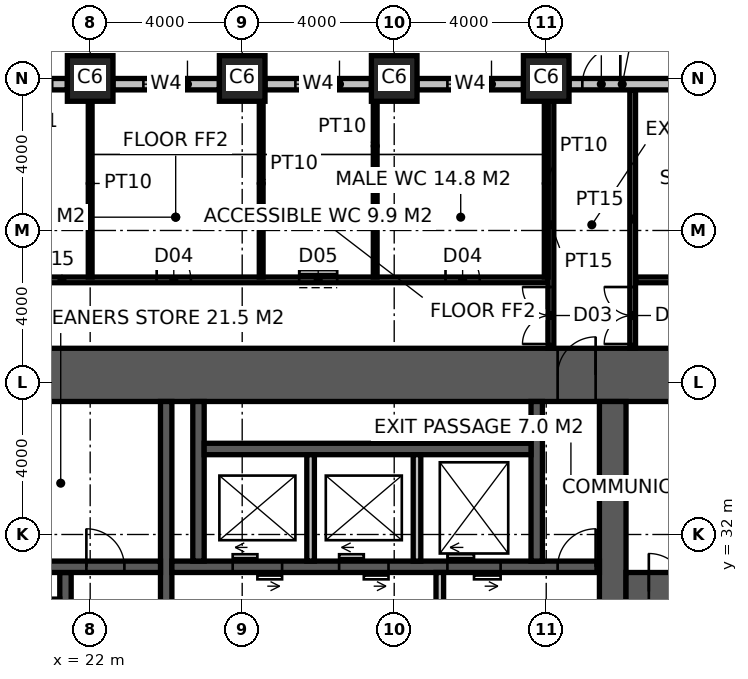
"""IFC4 building model, lengths in metres.
Left out: names, types, materials, properties, quantities, classifications, styles, units other than length and angle.
Written with IfcOpenShell. Run it as: python <this file> out.ifc"""

import sys

from ifc_helpers import new_model, si_unit, direction, frame, frame_2d, origin, origin_2d, place, context, subcontext, project, spatial, rectangle, hollow_rectangle, extrude, element, fill, save


model = new_model("IFC4")
c1 = context("Model", 3, precision=1e-05, world=origin(), true_north=direction((0.0, 1.0)))
c2 = subcontext(c1, "Body", "Model", "MODEL_VIEW")
j1 = project(units=[si_unit("LENGTHUNIT", "METRE"), si_unit("PLANEANGLEUNIT", "RADIAN")], contexts=[c1])
p1 = place(None, origin())
s1 = spatial("IfcSite", under=j1, at=p1, CompositionType="ELEMENT")
p2 = place(p1, origin())
s2 = spatial("IfcBuilding", under=s1, at=p2, CompositionType="ELEMENT")
p3 = place(p2, origin())
s3 = spatial("IfcBuildingStorey", under=s2, at=p3, CompositionType="ELEMENT", Elevation=0.0)
for number, where, z_axis, x_axis in (
    (1, (22.0, 44.0, -0.3), (0.0, 0.0, 1.0), (1.0, 0.0, 0.0)),
    (2, (26.0, 44.0, -0.3), (0.0, 0.0, 1.0), (1.0, 0.0, 0.0)),
    (3, (30.0, 44.0, -0.3), (0.0, 0.0, 1.0), (1.0, 0.0, 0.0)),
    (4, (34.0, 44.0, -0.3), (0.0, 0.0, 1.0), (1.0, 0.0, 0.0)),
):
    element("IfcColumn", number, at=place(p3, frame(where, z_axis=z_axis, x_axis=x_axis)), inside=s3, PredefinedType="COLUMN", context=c2, shape_type="SweptSolid", body=[
        extrude(hollow_rectangle(XDim=1.2, YDim=1.2, WallThickness=0.125, at=origin_2d()), origin(), (0.0, 0.0, 1.0), 6.3),
    ])
p4 = place(p3, frame((18.5, 36.2, -0.3), z_axis=(0.0, 0.0, 1.0), x_axis=(1.0, 0.0, 0.0)))
e5 = element("IfcWall", 5, at=p4, inside=s3, PredefinedType="SHEAR", context=c2, shape_type="SweptSolid", body=[
    extrude(rectangle(XDim=23.0, YDim=1.4, at=frame_2d((11.5, 0.0))), origin(), (0.0, 0.0, 1.0), 6.15),
])
p5 = place(p4, frame((15.8, 0.0, 0.3)))
e6 = element("IfcOpeningElement", 6, at=p5, cuts=e5, PredefinedType="OPENING", context=c2, shape_type="SweptSolid", body=[
    extrude(rectangle(XDim=1.0, YDim=2.2, at=frame_2d((0.5, 1.1))), frame((0.0, 0.71, 0.0), z_axis=(0.0, -1.0, 0.0), x_axis=(1.0, 0.0, 0.0)), (0.0, 0.0, 1.0), 1.42),
])
p6 = place(p3, frame((35.75, 18.5, -0.3), z_axis=(0.0, 0.0, 1.0), x_axis=(0.0, 1.0, 0.0)))
e7 = element("IfcWall", 7, at=p6, inside=s3, PredefinedType="SHEAR", context=c2, shape_type="SweptSolid", body=[
    extrude(rectangle(XDim=17.0, YDim=0.7, at=frame_2d((8.5, 0.0))), origin(), (0.0, 0.0, 1.0), 6.15),
])
p7 = place(p6, frame((9.85, 0.0, 0.3)))
e8 = element("IfcOpeningElement", 8, at=p7, cuts=e7, PredefinedType="OPENING", context=c2, shape_type="SweptSolid", body=[
    extrude(rectangle(XDim=1.0, YDim=2.2, at=frame_2d((0.5, 1.1))), frame((0.0, 0.36, 0.0), z_axis=(0.0, -1.0, 0.0), x_axis=(1.0, 0.0, 0.0)), (0.0, 0.0, 1.0), 0.72),
])
p8 = place(p3, frame((24.0, 18.5, -0.3), z_axis=(0.0, 0.0, 1.0), x_axis=(0.0, 1.0, 0.0)))
e9 = element("IfcWall", 9, at=p8, inside=s3, PredefinedType="SHEAR", context=c2, shape_type="SweptSolid", body=[
    extrude(rectangle(XDim=17.0, YDim=0.3, at=frame_2d((8.5, 0.0))), origin(), (0.0, 0.0, 1.0), 6.15),
])
p9 = place(p8, frame((9.6, 0.0, 0.3)))
e10 = element("IfcOpeningElement", 10, at=p9, cuts=e9, PredefinedType="OPENING", context=c2, shape_type="SweptSolid", body=[
    extrude(rectangle(XDim=1.5, YDim=2.4, at=frame_2d((0.75, 1.2))), frame((0.0, 0.16, 0.0), z_axis=(0.0, -1.0, 0.0), x_axis=(1.0, 0.0, 0.0)), (0.0, 0.0, 1.0), 0.32),
])
p10 = place(p3, frame((24.15, 31.15, -0.3), z_axis=(0.0, 0.0, 1.0), x_axis=(1.0, 0.0, 0.0)))
e11 = element("IfcWall", 11, at=p10, inside=s3, PredefinedType="SHEAR", context=c2, shape_type="SweptSolid", body=[
    extrude(rectangle(XDim=11.25, YDim=0.3, at=frame_2d((5.625, 0.0))), origin(), (0.0, 0.0, 1.0), 6.15),
])
p11 = place(p10, frame((10.15, 0.0, 0.3)))
e12 = element("IfcOpeningElement", 12, at=p11, cuts=e11, PredefinedType="OPENING", context=c2, shape_type="SweptSolid", body=[
    extrude(rectangle(XDim=1.0, YDim=2.2, at=frame_2d((0.5, 1.1))), frame((0.0, 0.16, 0.0), z_axis=(0.0, -1.0, 0.0), x_axis=(1.0, 0.0, 0.0)), (0.0, 0.0, 1.0), 0.32),
])
p12 = place(p10, frame((1.6, 0.0, 0.3)))
e13 = element("IfcOpeningElement", 13, at=p12, cuts=e11, PredefinedType="OPENING", context=c2, shape_type="SweptSolid", body=[
    extrude(rectangle(XDim=1.3, YDim=2.4, at=frame_2d((0.65, 1.2))), frame((0.0, 0.16, 0.0), z_axis=(0.0, -1.0, 0.0), x_axis=(1.0, 0.0, 0.0)), (0.0, 0.0, 1.0), 0.32),
])
p13 = place(p10, frame((4.4, 0.0, 0.3)))
e14 = element("IfcOpeningElement", 14, at=p13, cuts=e11, PredefinedType="OPENING", context=c2, shape_type="SweptSolid", body=[
    extrude(rectangle(XDim=1.3, YDim=2.4, at=frame_2d((0.65, 1.2))), frame((0.0, 0.16, 0.0), z_axis=(0.0, -1.0, 0.0), x_axis=(1.0, 0.0, 0.0)), (0.0, 0.0, 1.0), 0.32),
])
p14 = place(p10, frame((7.25, 0.0, 0.3)))
e15 = element("IfcOpeningElement", 15, at=p14, cuts=e11, PredefinedType="OPENING", context=c2, shape_type="SweptSolid", body=[
    extrude(rectangle(XDim=1.4, YDim=2.4, at=frame_2d((0.7, 1.2))), frame((0.0, 0.16, 0.0), z_axis=(0.0, -1.0, 0.0), x_axis=(1.0, 0.0, 0.0)), (0.0, 0.0, 1.0), 0.32),
])
p15 = place(p3, frame((21.35, 18.5, -0.3), z_axis=(0.0, 0.0, 1.0), x_axis=(0.0, 1.0, 0.0)))
e16 = element("IfcWall", 16, at=p15, inside=s3, PredefinedType="SHEAR", context=c2, shape_type="SweptSolid", body=[
    extrude(rectangle(XDim=12.5, YDim=0.3, at=frame_2d((6.25, 0.0))), origin(), (0.0, 0.0, 1.0), 6.15),
])
p16 = place(p15, frame((8.15, 0.0, 0.3)))
e17 = element("IfcOpeningElement", 17, at=p16, cuts=e16, PredefinedType="OPENING", context=c2, shape_type="SweptSolid", body=[
    extrude(rectangle(XDim=1.0, YDim=2.2, at=frame_2d((0.5, 1.1))), frame((0.0, 0.16, 0.0), z_axis=(0.0, -1.0, 0.0), x_axis=(1.0, 0.0, 0.0)), (0.0, 0.0, 1.0), 0.32),
])
p17 = place(p3, frame((18.5, 31.15, -0.3), z_axis=(0.0, 0.0, 1.0), x_axis=(1.0, 0.0, 0.0)))
e18 = element("IfcWall", 18, at=p17, inside=s3, PredefinedType="SHEAR", context=c2, shape_type="SweptSolid", body=[
    extrude(rectangle(XDim=5.35, YDim=0.3, at=frame_2d((2.675, 0.0))), origin(), (0.0, 0.0, 1.0), 6.15),
])
p18 = place(p17, frame((3.4, 0.0, 0.3)))
e19 = element("IfcOpeningElement", 19, at=p18, cuts=e18, PredefinedType="OPENING", context=c2, shape_type="SweptSolid", body=[
    extrude(rectangle(XDim=1.0, YDim=2.2, at=frame_2d((0.5, 1.1))), frame((0.0, 0.16, 0.0), z_axis=(0.0, -1.0, 0.0), x_axis=(1.0, 0.0, 0.0)), (0.0, 0.0, 1.0), 0.32),
])
for number, where, z_axis, x_axis in (
    (20, (24.85, 31.3, -0.3), (0.0, 0.0, 1.0), (0.0, 1.0, 0.0)),
    (21, (33.75, 31.3, -0.3), (0.0, 0.0, 1.0), (0.0, 1.0, 0.0)),
):
    element("IfcWall", number, at=place(p3, frame(where, z_axis=z_axis, x_axis=x_axis)), inside=s3, PredefinedType="SHEAR", context=c2, shape_type="SweptSolid", body=[
        extrude(rectangle(XDim=4.2, YDim=0.3, at=frame_2d((2.1, 0.0))), origin(), (0.0, 0.0, 1.0), 6.15),
    ])
p19 = place(p3, frame((25.0, 34.25, -0.3), z_axis=(0.0, 0.0, 1.0), x_axis=(1.0, 0.0, 0.0)))
e22 = element("IfcWall", 22, at=p19, inside=s3, PredefinedType="SHEAR", context=c2, shape_type="SweptSolid", body=[
    extrude(rectangle(XDim=8.6, YDim=0.3, at=frame_2d((4.3, 0.0))), origin(), (0.0, 0.0, 1.0), 6.15),
])
for number, where, z_axis, x_axis in (
    (23, (27.8, 31.3, -0.3), (0.0, 0.0, 1.0), (0.0, 1.0, 0.0)),
    (24, (30.6, 31.3, -0.3), (0.0, 0.0, 1.0), (0.0, 1.0, 0.0)),
):
    element("IfcWall", number, at=place(p3, frame(where, z_axis=z_axis, x_axis=x_axis)), inside=s3, PredefinedType="SOLIDWALL", context=c2, shape_type="SweptSolid", body=[
        extrude(rectangle(XDim=2.8, YDim=0.2, at=frame_2d((1.4, 0.0))), origin(), (0.0, 0.0, 1.0), 6.15),
    ])
p20 = place(p3, frame((36.1, 30.5, -0.3), z_axis=(0.0, 0.0, 1.0), x_axis=(1.0, 0.0, 0.0)))
e25 = element("IfcWall", 25, at=p20, inside=s3, PredefinedType="SHEAR", context=c2, shape_type="SweptSolid", body=[
    extrude(rectangle(XDim=5.4, YDim=1.0, at=frame_2d((2.7, 0.0))), origin(), (0.0, 0.0, 1.0), 6.15),
])
p21 = place(p20, frame((0.6, 0.0, 0.3)))
e26 = element("IfcOpeningElement", 26, at=p21, cuts=e25, PredefinedType="OPENING", context=c2, shape_type="SweptSolid", body=[
    extrude(rectangle(XDim=1.0, YDim=2.2, at=frame_2d((0.5, 1.1))), frame((0.0, 0.51, 0.0), z_axis=(0.0, -1.0, 0.0), x_axis=(1.0, 0.0, 0.0)), (0.0, 0.0, 1.0), 1.02),
])
p22 = place(p3, frame((31.2, 26.7, 0.0), z_axis=(0.0, 0.0, 1.0), x_axis=(0.0, 1.0, 0.0)))
e27 = element("IfcWall", 27, at=p22, inside=s3, PredefinedType="SOLIDWALL", context=c2, shape_type="SweptSolid", body=[
    extrude(rectangle(XDim=4.3, YDim=0.2, at=frame_2d((2.15, 0.0))), origin(), (0.0, 0.0, 1.0), 5.85),
])
p23 = place(p3, frame((15.775, 38.7, 0.0), z_axis=(0.0, 0.0, 1.0), x_axis=(1.0, 0.0, 0.0)))
e28 = element("IfcWall", 28, at=p23, inside=s3, PredefinedType="PARTITIONING", context=c2, shape_type="SweptSolid", body=[
    extrude(rectangle(XDim=18.275, YDim=0.15, at=frame_2d((9.138, 0.0))), origin(), (0.0, 0.0, 1.0), 5.85),
])
p24 = place(p23, frame((2.825, 0.0, 0.0)))
e29 = element("IfcOpeningElement", 29, at=p24, cuts=e28, PredefinedType="OPENING", context=c2, shape_type="SweptSolid", body=[
    extrude(rectangle(XDim=1.0, YDim=2.2, at=frame_2d((0.5, 1.1))), frame((0.0, 0.085, 0.0), z_axis=(0.0, -1.0, 0.0), x_axis=(1.0, 0.0, 0.0)), (0.0, 0.0, 1.0), 0.17),
])
p25 = place(p23, frame((7.975, 0.0, 0.0)))
e30 = element("IfcOpeningElement", 30, at=p25, cuts=e28, PredefinedType="OPENING", context=c2, shape_type="SweptSolid", body=[
    extrude(rectangle(XDim=0.9, YDim=2.1, at=frame_2d((0.45, 1.05))), frame((0.0, 0.085, 0.0), z_axis=(0.0, -1.0, 0.0), x_axis=(1.0, 0.0, 0.0)), (0.0, 0.0, 1.0), 0.17),
])
p26 = place(p23, frame((11.725, 0.0, 0.0)))
e31 = element("IfcOpeningElement", 31, at=p26, cuts=e28, PredefinedType="OPENING", context=c2, shape_type="SweptSolid", body=[
    extrude(rectangle(XDim=1.0, YDim=2.1, at=frame_2d((0.5, 1.05))), frame((0.0, 0.085, 0.0), z_axis=(0.0, -1.0, 0.0), x_axis=(1.0, 0.0, 0.0)), (0.0, 0.0, 1.0), 0.17),
])
p27 = place(p23, frame((15.575, 0.0, 0.0)))
e32 = element("IfcOpeningElement", 32, at=p27, cuts=e28, PredefinedType="OPENING", context=c2, shape_type="SweptSolid", body=[
    extrude(rectangle(XDim=0.9, YDim=2.1, at=frame_2d((0.45, 1.05))), frame((0.0, 0.085, 0.0), z_axis=(0.0, -1.0, 0.0), x_axis=(1.0, 0.0, 0.0)), (0.0, 0.0, 1.0), 0.17),
])
p28 = place(p3, frame((36.35, 38.7, 0.0), z_axis=(0.0, 0.0, 1.0), x_axis=(1.0, 0.0, 0.0)))
e33 = element("IfcWall", 33, at=p28, inside=s3, PredefinedType="PARTITIONING", context=c2, shape_type="SweptSolid", body=[
    extrude(rectangle(XDim=7.875, YDim=0.15, at=frame_2d((3.938, 0.0))), origin(), (0.0, 0.0, 1.0), 5.85),
])
p29 = place(p28, frame((2.15, 0.0, 0.0)))
e34 = element("IfcOpeningElement", 34, at=p29, cuts=e33, PredefinedType="OPENING", context=c2, shape_type="SweptSolid", body=[
    extrude(rectangle(XDim=1.0, YDim=2.2, at=frame_2d((0.5, 1.1))), frame((0.0, 0.085, 0.0), z_axis=(0.0, -1.0, 0.0), x_axis=(1.0, 0.0, 0.0)), (0.0, 0.0, 1.0), 0.17),
])
p30 = place(p3, frame((34.125, 36.9, 0.0), z_axis=(0.0, 0.0, 1.0), x_axis=(0.0, 1.0, 0.0)))
e35 = element("IfcWall", 35, at=p30, inside=s3, PredefinedType="PARTITIONING", context=c2, shape_type="SweptSolid", body=[
    extrude(rectangle(XDim=6.5, YDim=0.15, at=frame_2d((3.25, 0.0))), origin(), (0.0, 0.0, 1.0), 4.95),
])
p31 = place(p30, frame((0.113, 0.0, 0.0)))
e36 = element("IfcOpeningElement", 36, at=p31, cuts=e35, PredefinedType="OPENING", context=c2, shape_type="SweptSolid", body=[
    extrude(rectangle(XDim=1.5, YDim=2.4, at=frame_2d((0.75, 1.2))), frame((0.0, 0.085, 0.0), z_axis=(0.0, -1.0, 0.0), x_axis=(1.0, 0.0, 0.0)), (0.0, 0.0, 1.0), 0.17),
])
p32 = place(p3, frame((36.275, 36.9, 0.0), z_axis=(0.0, 0.0, 1.0), x_axis=(0.0, 1.0, 0.0)))
e37 = element("IfcWall", 37, at=p32, inside=s3, PredefinedType="PARTITIONING", context=c2, shape_type="SweptSolid", body=[
    extrude(rectangle(XDim=6.8, YDim=0.15, at=frame_2d((3.4, 0.0))), origin(), (0.0, 0.0, 1.0), 5.85),
])
p33 = place(p32, frame((0.113, 0.0, 0.0)))
e38 = element("IfcOpeningElement", 38, at=p33, cuts=e37, PredefinedType="OPENING", context=c2, shape_type="SweptSolid", body=[
    extrude(rectangle(XDim=1.5, YDim=2.4, at=frame_2d((0.75, 1.2))), frame((0.0, 0.085, 0.0), z_axis=(0.0, -1.0, 0.0), x_axis=(1.0, 0.0, 0.0)), (0.0, 0.0, 1.0), 0.17),
])
p34 = place(p3, frame((22.0, 38.775, 0.0), z_axis=(0.0, 0.0, 1.0), x_axis=(0.0, 1.0, 0.0)))
e39 = element("IfcWall", 39, at=p34, inside=s3, PredefinedType="PARTITIONING", context=c2, shape_type="SweptSolid", body=[
    extrude(rectangle(XDim=4.925, YDim=0.1, at=frame_2d((2.462, 0.0))), origin(), (0.0, 0.0, 1.0), 4.95),
])
for number, where, z_axis, x_axis in (
    (40, (26.5, 38.775, 0.0), (0.0, 0.0, 1.0), (0.0, 1.0, 0.0)),
    (41, (29.5, 38.775, 0.0), (0.0, 0.0, 1.0), (0.0, 1.0, 0.0)),
):
    element("IfcWall", number, at=place(p3, frame(where, z_axis=z_axis, x_axis=x_axis)), inside=s3, PredefinedType="PARTITIONING", context=c2, shape_type="SweptSolid", body=[
        extrude(rectangle(XDim=4.925, YDim=0.1, at=frame_2d((2.462, 0.0))), origin(), (0.0, 0.0, 1.0), 5.85),
    ])
p35 = place(p3, frame((34.0, 38.775, 0.0), z_axis=(0.0, 0.0, 1.0), x_axis=(0.0, 1.0, 0.0)))
e42 = element("IfcWall", 42, at=p35, inside=s3, PredefinedType="PARTITIONING", context=c2, shape_type="SweptSolid", body=[
    extrude(rectangle(XDim=4.925, YDim=0.1, at=frame_2d((2.462, 0.0))), origin(), (0.0, 0.0, 1.0), 4.95),
])
p36 = place(p3, frame((21.4, 43.85, 0.0), z_axis=(0.0, 0.0, 1.0), x_axis=(-1.0, 0.0, 0.0)))
e43 = element("IfcWall", 43, at=p36, inside=s3, PredefinedType="ELEMENTEDWALL", context=c2, shape_type="SweptSolid", body=[
    extrude(rectangle(XDim=2.8, YDim=0.3, at=frame_2d((1.4, 0.0))), origin(), (0.0, 0.0, 1.0), 4.95),
])
p37 = place(p36, frame((0.4, 0.0, 1.2)))
e44 = element("IfcOpeningElement", 44, at=p37, cuts=e43, PredefinedType="OPENING", context=c2, shape_type="SweptSolid", body=[
    extrude(rectangle(XDim=2.0, YDim=3.6, at=frame_2d((1.0, 1.8))), frame((0.0, 0.16, 0.0), z_axis=(0.0, -1.0, 0.0), x_axis=(1.0, 0.0, 0.0)), (0.0, 0.0, 1.0), 0.32),
])
p38 = place(p3, frame((25.4, 43.85, 0.0), z_axis=(0.0, 0.0, 1.0), x_axis=(-1.0, 0.0, 0.0)))
e45 = element("IfcWall", 45, at=p38, inside=s3, PredefinedType="ELEMENTEDWALL", context=c2, shape_type="SweptSolid", body=[
    extrude(rectangle(XDim=2.8, YDim=0.3, at=frame_2d((1.4, 0.0))), origin(), (0.0, 0.0, 1.0), 4.95),
])
p39 = place(p38, frame((0.8, 0.0, 1.8)))
e46 = element("IfcOpeningElement", 46, at=p39, cuts=e45, PredefinedType="OPENING", context=c2, shape_type="SweptSolid", body=[
    extrude(rectangle(XDim=1.2, YDim=1.2, at=frame_2d((0.6, 0.6))), frame((0.0, 0.16, 0.0), z_axis=(0.0, -1.0, 0.0), x_axis=(1.0, 0.0, 0.0)), (0.0, 0.0, 1.0), 0.32),
])
p40 = place(p3, frame((29.4, 43.85, 0.0), z_axis=(0.0, 0.0, 1.0), x_axis=(-1.0, 0.0, 0.0)))
e47 = element("IfcWall", 47, at=p40, inside=s3, PredefinedType="ELEMENTEDWALL", context=c2, shape_type="SweptSolid", body=[
    extrude(rectangle(XDim=2.8, YDim=0.3, at=frame_2d((1.4, 0.0))), origin(), (0.0, 0.0, 1.0), 4.95),
])
p41 = place(p40, frame((0.8, 0.0, 1.8)))
e48 = element("IfcOpeningElement", 48, at=p41, cuts=e47, PredefinedType="OPENING", context=c2, shape_type="SweptSolid", body=[
    extrude(rectangle(XDim=1.2, YDim=1.2, at=frame_2d((0.6, 0.6))), frame((0.0, 0.16, 0.0), z_axis=(0.0, -1.0, 0.0), x_axis=(1.0, 0.0, 0.0)), (0.0, 0.0, 1.0), 0.32),
])
p42 = place(p3, frame((33.4, 43.85, 0.0), z_axis=(0.0, 0.0, 1.0), x_axis=(-1.0, 0.0, 0.0)))
e49 = element("IfcWall", 49, at=p42, inside=s3, PredefinedType="ELEMENTEDWALL", context=c2, shape_type="SweptSolid", body=[
    extrude(rectangle(XDim=2.8, YDim=0.3, at=frame_2d((1.4, 0.0))), origin(), (0.0, 0.0, 1.0), 4.95),
])
p43 = place(p42, frame((0.8, 0.0, 1.8)))
e50 = element("IfcOpeningElement", 50, at=p43, cuts=e49, PredefinedType="OPENING", context=c2, shape_type="SweptSolid", body=[
    extrude(rectangle(XDim=1.2, YDim=1.2, at=frame_2d((0.6, 0.6))), frame((0.0, 0.16, 0.0), z_axis=(0.0, -1.0, 0.0), x_axis=(1.0, 0.0, 0.0)), (0.0, 0.0, 1.0), 0.32),
])
p44 = place(p3, frame((37.4, 43.85, 0.0), z_axis=(0.0, 0.0, 1.0), x_axis=(-1.0, 0.0, 0.0)))
e51 = element("IfcWall", 51, at=p44, inside=s3, PredefinedType="ELEMENTEDWALL", context=c2, shape_type="SweptSolid", body=[
    extrude(rectangle(XDim=2.8, YDim=0.3, at=frame_2d((1.4, 0.0))), origin(), (0.0, 0.0, 1.0), 4.95),
])
p45 = place(p44, frame((1.45, 0.0, 0.0)))
e52 = element("IfcOpeningElement", 52, at=p45, cuts=e51, PredefinedType="OPENING", context=c2, shape_type="SweptSolid", body=[
    extrude(rectangle(XDim=1.0, YDim=2.4, at=frame_2d((0.5, 1.2))), frame((0.0, 0.16, 0.0), z_axis=(0.0, -1.0, 0.0), x_axis=(1.0, 0.0, 0.0)), (0.0, 0.0, 1.0), 0.32),
])
p46 = place(p18, origin())
e53 = element("IfcDoor", 53, at=p46, inside=s3, OperationType="SINGLE_SWING_LEFT", PredefinedType="DOOR", context=c2, shape_type="SweptSolid", body=[
    extrude(rectangle(XDim=1.0, YDim=2.2, at=frame_2d((0.5, 1.1))), frame((0.0, 0.025, 0.0), z_axis=(0.0, -1.0, 0.0), x_axis=(1.0, 0.0, 0.0)), (0.0, 0.0, 1.0), 0.05),
])
fill(e19, e53)
p47 = place(p11, origin())
e54 = element("IfcDoor", 54, at=p47, inside=s3, OperationType="SINGLE_SWING_RIGHT", PredefinedType="DOOR", context=c2, shape_type="SweptSolid", body=[
    extrude(rectangle(XDim=1.0, YDim=2.2, at=frame_2d((0.5, 1.1))), frame((0.0, 0.025, 0.0), z_axis=(0.0, -1.0, 0.0), x_axis=(1.0, 0.0, 0.0)), (0.0, 0.0, 1.0), 0.05),
])
fill(e12, e54)
p48 = place(p5, origin())
e55 = element("IfcDoor", 55, at=p48, inside=s3, OperationType="SINGLE_SWING_RIGHT", PredefinedType="DOOR", context=c2, shape_type="SweptSolid", body=[
    extrude(rectangle(XDim=1.0, YDim=2.2, at=frame_2d((0.5, 1.1))), frame((0.0, 0.025, 0.0), z_axis=(0.0, -1.0, 0.0), x_axis=(1.0, 0.0, 0.0)), (0.0, 0.0, 1.0), 0.05),
])
fill(e6, e55)
p49 = place(p21, origin())
e56 = element("IfcDoor", 56, at=p49, inside=s3, OperationType="SINGLE_SWING_LEFT", PredefinedType="DOOR", context=c2, shape_type="SweptSolid", body=[
    extrude(rectangle(XDim=1.0, YDim=2.2, at=frame_2d((0.5, 1.1))), frame((0.0, 0.025, 0.0), z_axis=(0.0, -1.0, 0.0), x_axis=(1.0, 0.0, 0.0)), (0.0, 0.0, 1.0), 0.05),
])
fill(e26, e56)
p50 = place(p31, origin())
e57 = element("IfcDoor", 57, at=p50, inside=s3, OperationType="DOUBLE_DOOR_DOUBLE_SWING", PredefinedType="DOOR", context=c2, shape_type="SweptSolid", body=[
    extrude(rectangle(XDim=1.5, YDim=2.4, at=frame_2d((0.75, 1.2))), frame((0.0, 0.025, 0.0), z_axis=(0.0, -1.0, 0.0), x_axis=(1.0, 0.0, 0.0)), (0.0, 0.0, 1.0), 0.05),
])
fill(e36, e57)
p51 = place(p33, origin())
e58 = element("IfcDoor", 58, at=p51, inside=s3, OperationType="DOUBLE_DOOR_DOUBLE_SWING", PredefinedType="DOOR", context=c2, shape_type="SweptSolid", body=[
    extrude(rectangle(XDim=1.5, YDim=2.4, at=frame_2d((0.75, 1.2))), frame((0.0, 0.025, 0.0), z_axis=(0.0, -1.0, 0.0), x_axis=(1.0, 0.0, 0.0)), (0.0, 0.0, 1.0), 0.05),
])
fill(e38, e58)
p52 = place(p25, origin())
e59 = element("IfcDoor", 59, at=p52, inside=s3, OperationType="SINGLE_SWING_LEFT", PredefinedType="DOOR", context=c2, shape_type="SweptSolid", body=[
    extrude(rectangle(XDim=0.9, YDim=2.1, at=frame_2d((0.45, 1.05))), frame((0.0, 0.025, 0.0), z_axis=(0.0, -1.0, 0.0), x_axis=(1.0, 0.0, 0.0)), (0.0, 0.0, 1.0), 0.05),
])
fill(e30, e59)
p53 = place(p26, origin())
e60 = element("IfcDoor", 60, at=p53, inside=s3, OperationType="SLIDING_TO_LEFT", PredefinedType="DOOR", context=c2, shape_type="SweptSolid", body=[
    extrude(rectangle(XDim=1.0, YDim=2.1, at=frame_2d((0.5, 1.05))), frame((0.0, 0.025, 0.0), z_axis=(0.0, -1.0, 0.0), x_axis=(1.0, 0.0, 0.0)), (0.0, 0.0, 1.0), 0.05),
])
fill(e31, e60)
p54 = place(p27, origin())
e61 = element("IfcDoor", 61, at=p54, inside=s3, OperationType="SINGLE_SWING_LEFT", PredefinedType="DOOR", context=c2, shape_type="SweptSolid", body=[
    extrude(rectangle(XDim=0.9, YDim=2.1, at=frame_2d((0.45, 1.05))), frame((0.0, 0.025, 0.0), z_axis=(0.0, -1.0, 0.0), x_axis=(1.0, 0.0, 0.0)), (0.0, 0.0, 1.0), 0.05),
])
fill(e32, e61)
p55 = place(p12, origin())
e62 = element("IfcDoor", 62, at=p55, inside=s3, OperationType="DOUBLE_DOOR_SLIDING", PredefinedType="DOOR", context=c2, shape_type="SweptSolid", body=[
    extrude(rectangle(XDim=1.3, YDim=2.4, at=frame_2d((0.65, 1.2))), frame((0.0, 0.025, 0.0), z_axis=(0.0, -1.0, 0.0), x_axis=(1.0, 0.0, 0.0)), (0.0, 0.0, 1.0), 0.05),
])
fill(e13, e62)
p56 = place(p13, origin())
e63 = element("IfcDoor", 63, at=p56, inside=s3, OperationType="DOUBLE_DOOR_SLIDING", PredefinedType="DOOR", context=c2, shape_type="SweptSolid", body=[
    extrude(rectangle(XDim=1.3, YDim=2.4, at=frame_2d((0.65, 1.2))), frame((0.0, 0.025, 0.0), z_axis=(0.0, -1.0, 0.0), x_axis=(1.0, 0.0, 0.0)), (0.0, 0.0, 1.0), 0.05),
])
fill(e14, e63)
p57 = place(p14, origin())
e64 = element("IfcDoor", 64, at=p57, inside=s3, OperationType="DOUBLE_DOOR_SLIDING", PredefinedType="DOOR", context=c2, shape_type="SweptSolid", body=[
    extrude(rectangle(XDim=1.4, YDim=2.4, at=frame_2d((0.7, 1.2))), frame((0.0, 0.025, 0.0), z_axis=(0.0, -1.0, 0.0), x_axis=(1.0, 0.0, 0.0)), (0.0, 0.0, 1.0), 0.05),
])
fill(e15, e64)
p58 = place(p39, origin())
e65 = element("IfcWindow", 65, at=p58, inside=s3, PartitioningType="SINGLE_PANEL", PredefinedType="WINDOW", context=c2, shape_type="SweptSolid", body=[
    extrude(rectangle(XDim=1.2, YDim=1.2, at=frame_2d((0.6, 0.6))), frame((0.0, 0.03, 0.0), z_axis=(0.0, -1.0, 0.0), x_axis=(1.0, 0.0, 0.0)), (0.0, 0.0, 1.0), 0.06),
])
fill(e46, e65)
p59 = place(p41, origin())
e66 = element("IfcWindow", 66, at=p59, inside=s3, PartitioningType="SINGLE_PANEL", PredefinedType="WINDOW", context=c2, shape_type="SweptSolid", body=[
    extrude(rectangle(XDim=1.2, YDim=1.2, at=frame_2d((0.6, 0.6))), frame((0.0, 0.03, 0.0), z_axis=(0.0, -1.0, 0.0), x_axis=(1.0, 0.0, 0.0)), (0.0, 0.0, 1.0), 0.06),
])
fill(e48, e66)
p60 = place(p43, origin())
e67 = element("IfcWindow", 67, at=p60, inside=s3, PartitioningType="SINGLE_PANEL", PredefinedType="WINDOW", context=c2, shape_type="SweptSolid", body=[
    extrude(rectangle(XDim=1.2, YDim=1.2, at=frame_2d((0.6, 0.6))), frame((0.0, 0.03, 0.0), z_axis=(0.0, -1.0, 0.0), x_axis=(1.0, 0.0, 0.0)), (0.0, 0.0, 1.0), 0.06),
])
fill(e50, e67)
p61 = place(p45, frame((1.0, 0.0, 0.0), z_axis=(0.0, 0.0, 1.0), x_axis=(-1.0, 0.0, 0.0)))
e68 = element("IfcDoor", 68, at=p61, inside=s3, OperationType="SINGLE_SWING_RIGHT", PredefinedType="DOOR", context=c2, shape_type="SweptSolid", body=[
    extrude(rectangle(XDim=1.0, YDim=2.4, at=frame_2d((0.5, 1.2))), frame((0.0, 0.025, 0.0), z_axis=(0.0, -1.0, 0.0), x_axis=(1.0, 0.0, 0.0)), (0.0, 0.0, 1.0), 0.05),
])
fill(e52, e68)
save(model, sys.argv[1])
